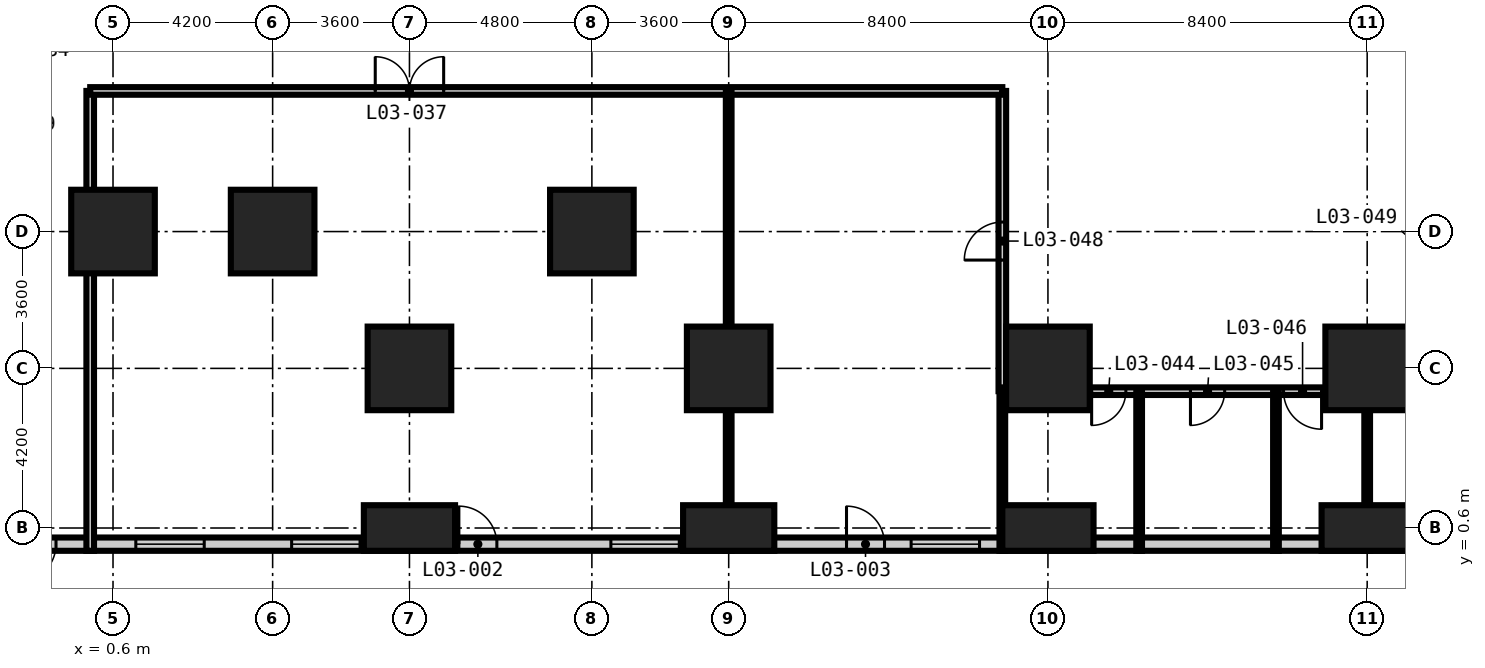
"""IFC4 building model, lengths in metres.
Left out: names, types, materials, properties, quantities, classifications, styles, units other than length and angle.
Written with IfcOpenShell. Run it as: python <this file> out.ifc"""

import sys

from ifc_helpers import new_model, si_unit, direction, frame, frame_2d, origin, origin_2d, place, context, subcontext, project, spatial, rectangle, extrude, element, fill, save


model = new_model("IFC4")
c1 = context("Model", 3, precision=1e-05, world=origin(), true_north=direction((0.0, 1.0)))
c2 = subcontext(c1, "Body", "Model", "MODEL_VIEW")
j1 = project(units=[si_unit("LENGTHUNIT", "METRE"), si_unit("PLANEANGLEUNIT", "RADIAN")], contexts=[c1])
p1 = place(None, origin())
s1 = spatial("IfcSite", under=j1, at=p1, CompositionType="ELEMENT")
p2 = place(p1, origin())
s2 = spatial("IfcBuilding", under=s1, at=p2, CompositionType="ELEMENT")
p3 = place(p2, frame((0.0, 0.0, 17.0)))
s3 = spatial("IfcBuildingStorey", under=s2, at=p3, CompositionType="ELEMENT", Elevation=17.0)
for number, where, z_axis, x_axis in (
    (1, (0.6, 8.4, -0.3), (0.0, 0.0, 1.0), (1.0, 0.0, 0.0)),
    (2, (4.8, 8.4, -0.3), (0.0, 0.0, 1.0), (1.0, 0.0, 0.0)),
):
    element("IfcColumn", number, at=place(p3, frame(where, z_axis=z_axis, x_axis=x_axis)), inside=s3, PredefinedType="COLUMN", context=c2, shape_type="SweptSolid", body=[
        extrude(rectangle(XDim=2.2, YDim=2.2, at=origin_2d()), origin(), (0.0, 0.0, 1.0), 4.95),
    ])
p4 = place(p3, frame((8.4, 0.6, -0.3), z_axis=(0.0, 0.0, 1.0), x_axis=(1.0, 0.0, 0.0)))
e3 = element("IfcColumn", 3, at=p4, inside=s3, PredefinedType="COLUMN", context=c2, shape_type="SweptSolid", body=[
    extrude(rectangle(XDim=2.4, YDim=1.2, at=origin_2d()), origin(), (0.0, 0.0, 1.0), 4.95),
])
for number, where, z_axis, x_axis in (
    (4, (8.4, 4.8, -0.3), (0.0, 0.0, 1.0), (1.0, 0.0, 0.0)),
    (5, (13.2, 8.4, -0.3), (0.0, 0.0, 1.0), (1.0, 0.0, 0.0)),
):
    element("IfcColumn", number, at=place(p3, frame(where, z_axis=z_axis, x_axis=x_axis)), inside=s3, PredefinedType="COLUMN", context=c2, shape_type="SweptSolid", body=[
        extrude(rectangle(XDim=2.2, YDim=2.2, at=origin_2d()), origin(), (0.0, 0.0, 1.0), 4.95),
    ])
p5 = place(p3, frame((16.8, 0.6, -0.3), z_axis=(0.0, 0.0, 1.0), x_axis=(1.0, 0.0, 0.0)))
e6 = element("IfcColumn", 6, at=p5, inside=s3, PredefinedType="COLUMN", context=c2, shape_type="SweptSolid", body=[
    extrude(rectangle(XDim=2.4, YDim=1.2, at=origin_2d()), origin(), (0.0, 0.0, 1.0), 4.95),
])
p6 = place(p3, frame((16.8, 4.8, -0.3), z_axis=(0.0, 0.0, 1.0), x_axis=(1.0, 0.0, 0.0)))
e7 = element("IfcColumn", 7, at=p6, inside=s3, PredefinedType="COLUMN", context=c2, shape_type="SweptSolid", body=[
    extrude(rectangle(XDim=2.2, YDim=2.2, at=origin_2d()), origin(), (0.0, 0.0, 1.0), 4.95),
])
p7 = place(p3, frame((25.2, 0.6, -0.3), z_axis=(0.0, 0.0, 1.0), x_axis=(1.0, 0.0, 0.0)))
e8 = element("IfcColumn", 8, at=p7, inside=s3, PredefinedType="COLUMN", context=c2, shape_type="SweptSolid", body=[
    extrude(rectangle(XDim=2.4, YDim=1.2, at=origin_2d()), origin(), (0.0, 0.0, 1.0), 4.95),
])
p8 = place(p3, frame((25.2, 4.8, -0.3), z_axis=(0.0, 0.0, 1.0), x_axis=(1.0, 0.0, 0.0)))
e9 = element("IfcColumn", 9, at=p8, inside=s3, PredefinedType="COLUMN", context=c2, shape_type="SweptSolid", body=[
    extrude(rectangle(XDim=2.2, YDim=2.2, at=origin_2d()), origin(), (0.0, 0.0, 1.0), 4.95),
])
p9 = place(p3, frame((33.6, 0.6, -0.3), z_axis=(0.0, 0.0, 1.0), x_axis=(1.0, 0.0, 0.0)))
e10 = element("IfcColumn", 10, at=p9, inside=s3, PredefinedType="COLUMN", context=c2, shape_type="SweptSolid", body=[
    extrude(rectangle(XDim=2.4, YDim=1.2, at=origin_2d()), origin(), (0.0, 0.0, 1.0), 4.95),
])
p10 = place(p3, frame((33.6, 4.8, -0.3), z_axis=(0.0, 0.0, 1.0), x_axis=(1.0, 0.0, 0.0)))
e11 = element("IfcColumn", 11, at=p10, inside=s3, PredefinedType="COLUMN", context=c2, shape_type="SweptSolid", body=[
    extrude(rectangle(XDim=2.2, YDim=2.2, at=origin_2d()), origin(), (0.0, 0.0, 1.0), 4.95),
])
p11 = place(p3, frame((-9.0, 0.175, 0.0), z_axis=(0.0, 0.0, 1.0), x_axis=(1.0, 0.0, 0.0)))
e12 = element("IfcWall", 12, at=p11, inside=s3, PredefinedType="SOLIDWALL", context=c2, shape_type="SweptSolid", body=[
    extrude(rectangle(XDim=67.8, YDim=0.35, at=frame_2d((33.9, 0.0))), origin(), (0.0, 0.0, 1.0), 4.65),
])
p12 = place(p11, frame((7.1, 0.0, 0.0)))
e13 = element("IfcOpeningElement", 13, at=p12, cuts=e12, PredefinedType="OPENING", context=c2, shape_type="SweptSolid", body=[
    extrude(rectangle(XDim=1.0, YDim=2.4, at=frame_2d((0.5, 1.2))), frame((0.0, 0.185, 0.0), z_axis=(0.0, -1.0, 0.0), x_axis=(1.0, 0.0, 0.0)), (0.0, 0.0, 1.0), 0.37),
])
p13 = place(p11, frame((18.7, 0.0, 0.0)))
e14 = element("IfcOpeningElement", 14, at=p13, cuts=e12, PredefinedType="OPENING", context=c2, shape_type="SweptSolid", body=[
    extrude(rectangle(XDim=1.0, YDim=2.4, at=frame_2d((0.5, 1.2))), frame((0.0, 0.185, 0.0), z_axis=(0.0, -1.0, 0.0), x_axis=(1.0, 0.0, 0.0)), (0.0, 0.0, 1.0), 0.37),
])
p14 = place(p11, frame((10.2, 0.0, 0.6)))
e15 = element("IfcOpeningElement", 15, at=p14, cuts=e12, PredefinedType="OPENING", context=c2, shape_type="SweptSolid", body=[
    extrude(rectangle(XDim=1.8, YDim=2.1, at=frame_2d((0.9, 1.05))), frame((0.0, 0.185, 0.0), z_axis=(0.0, -1.0, 0.0), x_axis=(1.0, 0.0, 0.0)), (0.0, 0.0, 1.0), 0.37),
])
p15 = place(p11, frame((14.3, 0.0, 0.6)))
e16 = element("IfcOpeningElement", 16, at=p15, cuts=e12, PredefinedType="OPENING", context=c2, shape_type="SweptSolid", body=[
    extrude(rectangle(XDim=1.8, YDim=2.1, at=frame_2d((0.9, 1.05))), frame((0.0, 0.185, 0.0), z_axis=(0.0, -1.0, 0.0), x_axis=(1.0, 0.0, 0.0)), (0.0, 0.0, 1.0), 0.37),
])
p16 = place(p11, frame((22.7, 0.0, 0.6)))
e17 = element("IfcOpeningElement", 17, at=p16, cuts=e12, PredefinedType="OPENING", context=c2, shape_type="SweptSolid", body=[
    extrude(rectangle(XDim=1.8, YDim=2.1, at=frame_2d((0.9, 1.05))), frame((0.0, 0.185, 0.0), z_axis=(0.0, -1.0, 0.0), x_axis=(1.0, 0.0, 0.0)), (0.0, 0.0, 1.0), 0.37),
])
p17 = place(p11, frame((28.9, 0.0, 0.0)))
e18 = element("IfcOpeningElement", 18, at=p17, cuts=e12, PredefinedType="OPENING", context=c2, shape_type="SweptSolid", body=[
    extrude(rectangle(XDim=1.0, YDim=2.4, at=frame_2d((0.5, 1.2))), frame((0.0, 0.185, 0.0), z_axis=(0.0, -1.0, 0.0), x_axis=(1.0, 0.0, 0.0)), (0.0, 0.0, 1.0), 0.37),
])
p18 = place(p11, frame((30.6, 0.0, 0.6)))
e19 = element("IfcOpeningElement", 19, at=p18, cuts=e12, PredefinedType="OPENING", context=c2, shape_type="SweptSolid", body=[
    extrude(rectangle(XDim=1.8, YDim=2.1, at=frame_2d((0.9, 1.05))), frame((0.0, 0.185, 0.0), z_axis=(0.0, -1.0, 0.0), x_axis=(1.0, 0.0, 0.0)), (0.0, 0.0, 1.0), 0.37),
])
p19 = place(p11, frame((54.7, 0.0, 0.0)))
e20 = element("IfcOpeningElement", 20, at=p19, cuts=e12, PredefinedType="OPENING", context=c2, shape_type="SweptSolid", body=[
    extrude(rectangle(XDim=1.0, YDim=2.4, at=frame_2d((0.5, 1.2))), frame((0.0, 0.185, 0.0), z_axis=(0.0, -1.0, 0.0), x_axis=(1.0, 0.0, 0.0)), (0.0, 0.0, 1.0), 0.37),
])
p20 = place(p11, frame((43.9, 0.0, 0.6)))
e21 = element("IfcOpeningElement", 21, at=p20, cuts=e12, PredefinedType="OPENING", context=c2, shape_type="SweptSolid", body=[
    extrude(rectangle(XDim=1.8, YDim=2.1, at=frame_2d((0.9, 1.05))), frame((0.0, 0.185, 0.0), z_axis=(0.0, -1.0, 0.0), x_axis=(1.0, 0.0, 0.0)), (0.0, 0.0, 1.0), 0.37),
])
p21 = place(p11, frame((47.9, 0.0, 0.6)))
e22 = element("IfcOpeningElement", 22, at=p21, cuts=e12, PredefinedType="OPENING", context=c2, shape_type="SweptSolid", body=[
    extrude(rectangle(XDim=1.8, YDim=2.1, at=frame_2d((0.9, 1.05))), frame((0.0, 0.185, 0.0), z_axis=(0.0, -1.0, 0.0), x_axis=(1.0, 0.0, 0.0)), (0.0, 0.0, 1.0), 0.37),
])
p22 = place(p11, frame((52.3, 0.0, 0.6)))
e23 = element("IfcOpeningElement", 23, at=p22, cuts=e12, PredefinedType="OPENING", context=c2, shape_type="SweptSolid", body=[
    extrude(rectangle(XDim=1.8, YDim=2.1, at=frame_2d((0.9, 1.05))), frame((0.0, 0.185, 0.0), z_axis=(0.0, -1.0, 0.0), x_axis=(1.0, 0.0, 0.0)), (0.0, 0.0, 1.0), 0.37),
])
p23 = place(p11, frame((56.3, 0.0, 0.6)))
e24 = element("IfcOpeningElement", 24, at=p23, cuts=e12, PredefinedType="OPENING", context=c2, shape_type="SweptSolid", body=[
    extrude(rectangle(XDim=1.8, YDim=2.1, at=frame_2d((0.9, 1.05))), frame((0.0, 0.185, 0.0), z_axis=(0.0, -1.0, 0.0), x_axis=(1.0, 0.0, 0.0)), (0.0, 0.0, 1.0), 0.37),
])
p24 = place(p11, frame((60.7, 0.0, 0.6)))
e25 = element("IfcOpeningElement", 25, at=p24, cuts=e12, PredefinedType="OPENING", context=c2, shape_type="SweptSolid", body=[
    extrude(rectangle(XDim=1.8, YDim=2.1, at=frame_2d((0.9, 1.05))), frame((0.0, 0.185, 0.0), z_axis=(0.0, -1.0, 0.0), x_axis=(1.0, 0.0, 0.0)), (0.0, 0.0, 1.0), 0.37),
])
p25 = place(p11, frame((64.8, 0.0, 0.6)))
e26 = element("IfcOpeningElement", 26, at=p25, cuts=e12, PredefinedType="OPENING", context=c2, shape_type="SweptSolid", body=[
    extrude(rectangle(XDim=1.8, YDim=2.1, at=frame_2d((0.9, 1.05))), frame((0.0, 0.185, 0.0), z_axis=(0.0, -1.0, 0.0), x_axis=(1.0, 0.0, 0.0)), (0.0, 0.0, 1.0), 0.37),
])
p26 = place(p3, frame((0.0, 0.0, 0.0), z_axis=(0.0, 0.0, 1.0), x_axis=(0.0, 1.0, 0.0)))
e27 = element("IfcWall", 27, at=p26, inside=s3, PredefinedType="PARTITIONING", context=c2, shape_type="SweptSolid", body=[
    extrude(rectangle(XDim=12.1, YDim=0.2, at=frame_2d((6.05, 0.0))), origin(), (0.0, 0.0, 1.0), 4.65),
])
p27 = place(p3, frame((24.0, 4.2, 0.0), z_axis=(0.0, 0.0, 1.0), x_axis=(0.0, 1.0, 0.0)))
e28 = element("IfcWall", 28, at=p27, inside=s3, PredefinedType="PARTITIONING", context=c2, shape_type="SweptSolid", body=[
    extrude(rectangle(XDim=7.9, YDim=0.2, at=frame_2d((3.95, 0.0))), origin(), (0.0, 0.0, 1.0), 4.65),
])
p28 = place(p27, frame((3.45, 0.0, 0.0)))
e29 = element("IfcOpeningElement", 29, at=p28, cuts=e28, PredefinedType="OPENING", context=c2, shape_type="SweptSolid", body=[
    extrude(rectangle(XDim=1.0, YDim=2.1, at=frame_2d((0.5, 1.05))), frame((0.0, 0.11, 0.0), z_axis=(0.0, -1.0, 0.0), x_axis=(1.0, 0.0, 0.0)), (0.0, 0.0, 1.0), 0.22),
])
p29 = place(p3, frame((24.0, 4.2, 0.0), z_axis=(0.0, 0.0, 1.0), x_axis=(1.0, 0.0, 0.0)))
e30 = element("IfcWall", 30, at=p29, inside=s3, PredefinedType="PARTITIONING", context=c2, shape_type="SweptSolid", body=[
    extrude(rectangle(XDim=10.8, YDim=0.2, at=frame_2d((5.4, 0.0))), origin(), (0.0, 0.0, 1.0), 4.65),
])
p30 = place(p29, frame((2.35, 0.0, 0.0)))
e31 = element("IfcOpeningElement", 31, at=p30, cuts=e30, PredefinedType="OPENING", context=c2, shape_type="SweptSolid", body=[
    extrude(rectangle(XDim=0.9, YDim=2.1, at=frame_2d((0.45, 1.05))), frame((0.0, 0.11, 0.0), z_axis=(0.0, -1.0, 0.0), x_axis=(1.0, 0.0, 0.0)), (0.0, 0.0, 1.0), 0.22),
])
p31 = place(p29, frame((4.95, 0.0, 0.0)))
e32 = element("IfcOpeningElement", 32, at=p31, cuts=e30, PredefinedType="OPENING", context=c2, shape_type="SweptSolid", body=[
    extrude(rectangle(XDim=0.9, YDim=2.1, at=frame_2d((0.45, 1.05))), frame((0.0, 0.11, 0.0), z_axis=(0.0, -1.0, 0.0), x_axis=(1.0, 0.0, 0.0)), (0.0, 0.0, 1.0), 0.22),
])
p32 = place(p29, frame((7.4, 0.0, 0.0)))
e33 = element("IfcOpeningElement", 33, at=p32, cuts=e30, PredefinedType="OPENING", context=c2, shape_type="SweptSolid", body=[
    extrude(rectangle(XDim=1.0, YDim=2.1, at=frame_2d((0.5, 1.05))), frame((0.0, 0.11, 0.0), z_axis=(0.0, -1.0, 0.0), x_axis=(1.0, 0.0, 0.0)), (0.0, 0.0, 1.0), 0.22),
])
p33 = place(p3, frame((0.0, 12.1, 0.0), z_axis=(0.0, 0.0, 1.0), x_axis=(1.0, 0.0, 0.0)))
e34 = element("IfcWall", 34, at=p33, inside=s3, PredefinedType="PARTITIONING", context=c2, shape_type="SweptSolid", body=[
    extrude(rectangle(XDim=24.0, YDim=0.2, at=frame_2d((12.0, 0.0))), origin(), (0.0, 0.0, 1.0), 4.65),
])
p34 = place(p33, frame((7.5, 0.0, 0.0)))
e35 = element("IfcOpeningElement", 35, at=p34, cuts=e34, PredefinedType="OPENING", context=c2, shape_type="SweptSolid", body=[
    extrude(rectangle(XDim=1.8, YDim=2.4, at=frame_2d((0.9, 1.2))), frame((0.0, 0.11, 0.0), z_axis=(0.0, -1.0, 0.0), x_axis=(1.0, 0.0, 0.0)), (0.0, 0.0, 1.0), 0.22),
])
p35 = place(p3, frame((16.8, 0.0, 0.0), z_axis=(0.0, 0.0, 1.0), x_axis=(0.0, 1.0, 0.0)))
e36 = element("IfcWall", 36, at=p35, inside=s3, PredefinedType="PARTITIONING", context=c2, shape_type="SweptSolid", body=[
    extrude(rectangle(XDim=12.1, YDim=0.15, at=frame_2d((6.05, 0.0))), origin(), (0.0, 0.0, 1.0), 4.65),
])
for number, where, z_axis, x_axis in (
    (37, (24.0, 0.0, 0.0), (0.0, 0.0, 1.0), (0.0, 1.0, 0.0)),
    (38, (27.6, 0.0, 0.0), (0.0, 0.0, 1.0), (0.0, 1.0, 0.0)),
    (39, (31.2, 0.0, 0.0), (0.0, 0.0, 1.0), (0.0, 1.0, 0.0)),
    (40, (33.6, 0.0, 0.0), (0.0, 0.0, 1.0), (0.0, 1.0, 0.0)),
):
    element("IfcWall", number, at=place(p3, frame(where, z_axis=z_axis, x_axis=x_axis)), inside=s3, PredefinedType="PARTITIONING", context=c2, shape_type="SweptSolid", body=[
        extrude(rectangle(XDim=4.2, YDim=0.15, at=frame_2d((2.1, 0.0))), origin(), (0.0, 0.0, 1.0), 4.65),
    ])
p36 = place(p12, frame((1.0, 0.0, 0.0), z_axis=(0.0, 0.0, 1.0), x_axis=(-1.0, 0.0, 0.0)))
e41 = element("IfcDoor", 41, at=p36, inside=s3, OperationType="SINGLE_SWING_RIGHT", PredefinedType="DOOR", context=c2, shape_type="SweptSolid", body=[
    extrude(rectangle(XDim=1.0, YDim=2.4, at=frame_2d((0.5, 1.2))), frame((0.0, 0.025, 0.0), z_axis=(0.0, -1.0, 0.0), x_axis=(1.0, 0.0, 0.0)), (0.0, 0.0, 1.0), 0.05),
])
fill(e13, e41)
p37 = place(p13, origin())
e42 = element("IfcDoor", 42, at=p37, inside=s3, OperationType="SINGLE_SWING_LEFT", PredefinedType="DOOR", context=c2, shape_type="SweptSolid", body=[
    extrude(rectangle(XDim=1.0, YDim=2.4, at=frame_2d((0.5, 1.2))), frame((0.0, 0.025, 0.0), z_axis=(0.0, -1.0, 0.0), x_axis=(1.0, 0.0, 0.0)), (0.0, 0.0, 1.0), 0.05),
])
fill(e14, e42)
p38 = place(p14, origin())
e43 = element("IfcWindow", 43, at=p38, inside=s3, PartitioningType="SINGLE_PANEL", PredefinedType="WINDOW", context=c2, shape_type="SweptSolid", body=[
    extrude(rectangle(XDim=1.8, YDim=2.1, at=frame_2d((0.9, 1.05))), frame((0.0, 0.03, 0.0), z_axis=(0.0, -1.0, 0.0), x_axis=(1.0, 0.0, 0.0)), (0.0, 0.0, 1.0), 0.06),
])
fill(e15, e43)
p39 = place(p15, origin())
e44 = element("IfcWindow", 44, at=p39, inside=s3, PartitioningType="SINGLE_PANEL", PredefinedType="WINDOW", context=c2, shape_type="SweptSolid", body=[
    extrude(rectangle(XDim=1.8, YDim=2.1, at=frame_2d((0.9, 1.05))), frame((0.0, 0.03, 0.0), z_axis=(0.0, -1.0, 0.0), x_axis=(1.0, 0.0, 0.0)), (0.0, 0.0, 1.0), 0.06),
])
fill(e16, e44)
p40 = place(p16, origin())
e45 = element("IfcWindow", 45, at=p40, inside=s3, PartitioningType="SINGLE_PANEL", PredefinedType="WINDOW", context=c2, shape_type="SweptSolid", body=[
    extrude(rectangle(XDim=1.8, YDim=2.1, at=frame_2d((0.9, 1.05))), frame((0.0, 0.03, 0.0), z_axis=(0.0, -1.0, 0.0), x_axis=(1.0, 0.0, 0.0)), (0.0, 0.0, 1.0), 0.06),
])
fill(e17, e45)
p41 = place(p17, origin())
e46 = element("IfcDoor", 46, at=p41, inside=s3, OperationType="SINGLE_SWING_LEFT", PredefinedType="DOOR", context=c2, shape_type="SweptSolid", body=[
    extrude(rectangle(XDim=1.0, YDim=2.4, at=frame_2d((0.5, 1.2))), frame((0.0, 0.025, 0.0), z_axis=(0.0, -1.0, 0.0), x_axis=(1.0, 0.0, 0.0)), (0.0, 0.0, 1.0), 0.05),
])
fill(e18, e46)
p42 = place(p18, origin())
e47 = element("IfcWindow", 47, at=p42, inside=s3, PartitioningType="SINGLE_PANEL", PredefinedType="WINDOW", context=c2, shape_type="SweptSolid", body=[
    extrude(rectangle(XDim=1.8, YDim=2.1, at=frame_2d((0.9, 1.05))), frame((0.0, 0.03, 0.0), z_axis=(0.0, -1.0, 0.0), x_axis=(1.0, 0.0, 0.0)), (0.0, 0.0, 1.0), 0.06),
])
fill(e19, e47)
p43 = place(p34, origin())
e48 = element("IfcDoor", 48, at=p43, inside=s3, OperationType="DOUBLE_DOOR_DOUBLE_SWING", PredefinedType="DOOR", context=c2, shape_type="SweptSolid", body=[
    extrude(rectangle(XDim=1.8, YDim=2.4, at=frame_2d((0.9, 1.2))), frame((0.0, 0.025, 0.0), z_axis=(0.0, -1.0, 0.0), x_axis=(1.0, 0.0, 0.0)), (0.0, 0.0, 1.0), 0.05),
])
fill(e35, e48)
p44 = place(p30, frame((0.9, 0.0, 0.0), z_axis=(0.0, 0.0, 1.0), x_axis=(-1.0, 0.0, 0.0)))
e49 = element("IfcDoor", 49, at=p44, inside=s3, OperationType="SINGLE_SWING_RIGHT", PredefinedType="DOOR", context=c2, shape_type="SweptSolid", body=[
    extrude(rectangle(XDim=0.9, YDim=2.1, at=frame_2d((0.45, 1.05))), frame((0.0, 0.025, 0.0), z_axis=(0.0, -1.0, 0.0), x_axis=(1.0, 0.0, 0.0)), (0.0, 0.0, 1.0), 0.05),
])
fill(e31, e49)
p45 = place(p31, frame((0.9, 0.0, 0.0), z_axis=(0.0, 0.0, 1.0), x_axis=(-1.0, 0.0, 0.0)))
e50 = element("IfcDoor", 50, at=p45, inside=s3, OperationType="SINGLE_SWING_RIGHT", PredefinedType="DOOR", context=c2, shape_type="SweptSolid", body=[
    extrude(rectangle(XDim=0.9, YDim=2.1, at=frame_2d((0.45, 1.05))), frame((0.0, 0.025, 0.0), z_axis=(0.0, -1.0, 0.0), x_axis=(1.0, 0.0, 0.0)), (0.0, 0.0, 1.0), 0.05),
])
fill(e32, e50)
p46 = place(p32, frame((1.0, 0.0, 0.0), z_axis=(0.0, 0.0, 1.0), x_axis=(-1.0, 0.0, 0.0)))
e51 = element("IfcDoor", 51, at=p46, inside=s3, OperationType="SINGLE_SWING_LEFT", PredefinedType="DOOR", context=c2, shape_type="SweptSolid", body=[
    extrude(rectangle(XDim=1.0, YDim=2.1, at=frame_2d((0.5, 1.05))), frame((0.0, 0.025, 0.0), z_axis=(0.0, -1.0, 0.0), x_axis=(1.0, 0.0, 0.0)), (0.0, 0.0, 1.0), 0.05),
])
fill(e33, e51)
p47 = place(p28, origin())
e52 = element("IfcDoor", 52, at=p47, inside=s3, OperationType="SINGLE_SWING_LEFT", PredefinedType="DOOR", context=c2, shape_type="SweptSolid", body=[
    extrude(rectangle(XDim=1.0, YDim=2.1, at=frame_2d((0.5, 1.05))), frame((0.0, 0.025, 0.0), z_axis=(0.0, -1.0, 0.0), x_axis=(1.0, 0.0, 0.0)), (0.0, 0.0, 1.0), 0.05),
])
fill(e29, e52)
save(model, sys.argv[1])
